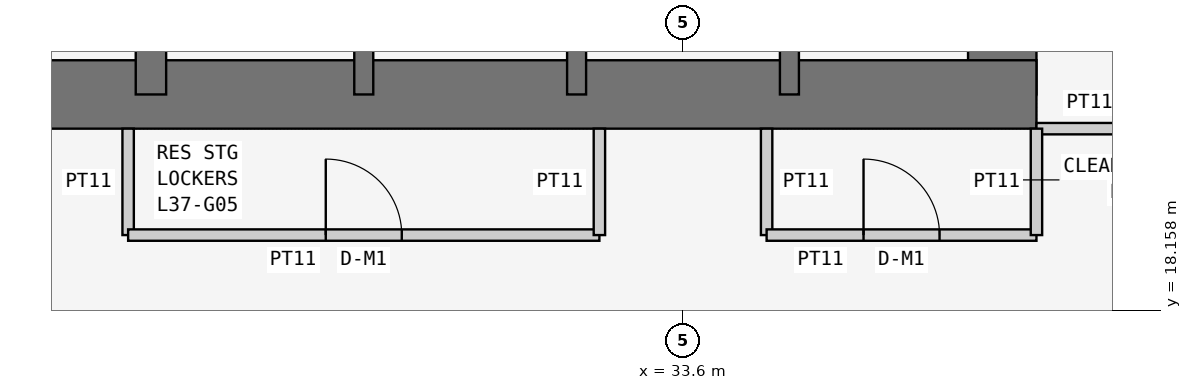
"""IFC4 building model, lengths in metres.
Left out: names, types, materials, properties, quantities, classifications, styles, units other than length and angle.
Written with IfcOpenShell. Run it as: python <this file> out.ifc"""

import sys

from ifc_helpers import new_model, si_unit, direction, frame, frame_2d, origin, place, context, subcontext, project, spatial, rectangle, extrude, element, fill, save


model = new_model("IFC4")
c1 = context("Model", 3, precision=1e-05, world=origin(), true_north=direction((0.0, 1.0)))
c2 = subcontext(c1, "Body", "Model", "MODEL_VIEW")
j1 = project(units=[si_unit("LENGTHUNIT", "METRE"), si_unit("PLANEANGLEUNIT", "RADIAN")], contexts=[c1])
p1 = place(None, origin())
s1 = spatial("IfcSite", under=j1, at=p1, CompositionType="ELEMENT")
p2 = place(p1, origin())
s2 = spatial("IfcBuilding", under=s1, at=p2, CompositionType="ELEMENT")
p3 = place(p2, frame((0.0, 0.0, 144.9)))
s3 = spatial("IfcBuildingStorey", under=s2, at=p3, CompositionType="ELEMENT", Elevation=144.9)
p4 = place(p3, frame((21.0, 21.0, 0.0), z_axis=(0.0, 0.0, 1.0), x_axis=(1.0, 0.0, 0.0)))
e1 = element("IfcWall", 1, at=p4, inside=s3, PredefinedType="SHEAR", context=c2, shape_type="SweptSolid", body=[
    extrude(rectangle(XDim=17.25, YDim=0.9, at=frame_2d((8.625, 0.0))), origin(), (0.0, 0.0, 1.0), 3.6),
])
p5 = place(p3, frame((37.8, 21.0, 0.0), z_axis=(0.0, 0.0, 1.0), x_axis=(0.0, 1.0, 0.0)))
e2 = element("IfcWall", 2, at=p5, inside=s3, PredefinedType="SHEAR", context=c2, shape_type="SweptSolid", body=[
    extrude(rectangle(XDim=17.25, YDim=0.9, at=frame_2d((8.625, 0.0))), origin(), (0.0, 0.0, 1.0), 3.6),
])
p6 = place(p5, frame((5.2, 0.0, 0.0)))
e3 = element("IfcOpeningElement", 3, at=p6, cuts=e2, PredefinedType="OPENING", context=c2, shape_type="SweptSolid", body=[
    extrude(rectangle(XDim=1.2, YDim=2.1, at=frame_2d((0.6, 1.05))), frame((0.0, 0.46, 0.0), z_axis=(0.0, -1.0, 0.0), x_axis=(1.0, 0.0, 0.0)), (0.0, 0.0, 1.0), 0.92),
])
p7 = place(p3, frame((26.6, 21.0, 0.0), z_axis=(0.0, 0.0, 1.0), x_axis=(0.0, 1.0, 0.0)))
e4 = element("IfcWall", 4, at=p7, inside=s3, PredefinedType="SHEAR", context=c2, shape_type="SweptSolid", body=[
    extrude(rectangle(XDim=16.8, YDim=0.4, at=frame_2d((8.4, 0.0))), origin(), (0.0, 0.0, 1.0), 3.6),
])
p8 = place(p7, frame((10.4, 0.0, 0.0)))
e5 = element("IfcOpeningElement", 5, at=p8, cuts=e4, PredefinedType="OPENING", context=c2, shape_type="SweptSolid", body=[
    extrude(rectangle(XDim=1.2, YDim=2.1, at=frame_2d((0.6, 1.05))), frame((0.0, 0.21, 0.0), z_axis=(0.0, -1.0, 0.0), x_axis=(1.0, 0.0, 0.0)), (0.0, 0.0, 1.0), 0.42),
])
for number, where, z_axis, x_axis in (
    (6, (29.4, 21.0, 0.0), (0.0, 0.0, 1.0), (0.0, 1.0, 0.0)),
    (7, (32.2, 21.0, 0.0), (0.0, 0.0, 1.0), (0.0, 1.0, 0.0)),
    (8, (35.0, 21.0, 0.0), (0.0, 0.0, 1.0), (0.0, 1.0, 0.0)),
):
    element("IfcWall", number, at=place(p3, frame(where, z_axis=z_axis, x_axis=x_axis)), inside=s3, PredefinedType="SHEAR", context=c2, shape_type="SweptSolid", body=[
        extrude(rectangle(XDim=3.2, YDim=0.25, at=frame_2d((1.6, 0.0))), origin(), (0.0, 0.0, 1.0), 3.6),
    ])
p9 = place(p3, frame((38.25, 20.55, 0.0), z_axis=(0.0, 0.0, 1.0), x_axis=(1.0, 0.0, 0.0)))
e9 = element("IfcWall", 9, at=p9, inside=s3, PredefinedType="PARTITIONING", context=c2, shape_type="SweptSolid", body=[
    extrude(rectangle(XDim=1.4, YDim=0.15, at=frame_2d((0.7, 0.0))), origin(), (0.0, 0.0, 1.0), 3.45),
])
p10 = place(p3, frame((26.3, 20.55, 0.0), z_axis=(0.0, 0.0, 1.0), x_axis=(0.0, -1.0, 0.0)))
e10 = element("IfcWall", 10, at=p10, inside=s3, PredefinedType="PARTITIONING", context=c2, shape_type="SweptSolid", body=[
    extrude(rectangle(XDim=1.4, YDim=0.15, at=frame_2d((0.7, 0.0))), origin(), (0.0, 0.0, 1.0), 3.45),
])
p11 = place(p3, frame((26.3, 19.15, 0.0), z_axis=(0.0, 0.0, 1.0), x_axis=(1.0, 0.0, 0.0)))
e11 = element("IfcWall", 11, at=p11, inside=s3, PredefinedType="PARTITIONING", context=c2, shape_type="SweptSolid", body=[
    extrude(rectangle(XDim=6.2, YDim=0.15, at=frame_2d((3.1, 0.0))), origin(), (0.0, 0.0, 1.0), 3.45),
])
p12 = place(p11, frame((2.6, 0.0, 0.0)))
e12 = element("IfcOpeningElement", 12, at=p12, cuts=e11, PredefinedType="OPENING", context=c2, shape_type="SweptSolid", body=[
    extrude(rectangle(XDim=1.0, YDim=2.1, at=frame_2d((0.5, 1.05))), frame((0.0, 0.085, 0.0), z_axis=(0.0, -1.0, 0.0), x_axis=(1.0, 0.0, 0.0)), (0.0, 0.0, 1.0), 0.17),
])
for number, where, z_axis, x_axis in (
    (13, (32.5, 19.15, 0.0), (0.0, 0.0, 1.0), (0.0, 1.0, 0.0)),
    (14, (34.7, 20.55, 0.0), (0.0, 0.0, 1.0), (0.0, -1.0, 0.0)),
):
    element("IfcWall", number, at=place(p3, frame(where, z_axis=z_axis, x_axis=x_axis)), inside=s3, PredefinedType="PARTITIONING", context=c2, shape_type="SweptSolid", body=[
        extrude(rectangle(XDim=1.4, YDim=0.15, at=frame_2d((0.7, 0.0))), origin(), (0.0, 0.0, 1.0), 3.45),
    ])
p13 = place(p3, frame((34.7, 19.15, 0.0), z_axis=(0.0, 0.0, 1.0), x_axis=(1.0, 0.0, 0.0)))
e15 = element("IfcWall", 15, at=p13, inside=s3, PredefinedType="PARTITIONING", context=c2, shape_type="SweptSolid", body=[
    extrude(rectangle(XDim=3.55, YDim=0.15, at=frame_2d((1.775, 0.0))), origin(), (0.0, 0.0, 1.0), 3.45),
])
p14 = place(p13, frame((1.275, 0.0, 0.0)))
e16 = element("IfcOpeningElement", 16, at=p14, cuts=e15, PredefinedType="OPENING", context=c2, shape_type="SweptSolid", body=[
    extrude(rectangle(XDim=1.0, YDim=2.1, at=frame_2d((0.5, 1.05))), frame((0.0, 0.085, 0.0), z_axis=(0.0, -1.0, 0.0), x_axis=(1.0, 0.0, 0.0)), (0.0, 0.0, 1.0), 0.17),
])
p15 = place(p3, frame((38.25, 19.15, 0.0), z_axis=(0.0, 0.0, 1.0), x_axis=(0.0, 1.0, 0.0)))
e17 = element("IfcWall", 17, at=p15, inside=s3, PredefinedType="PARTITIONING", context=c2, shape_type="SweptSolid", body=[
    extrude(rectangle(XDim=1.4, YDim=0.15, at=frame_2d((0.7, 0.0))), origin(), (0.0, 0.0, 1.0), 3.45),
])
p16 = place(p12, origin())
e18 = element("IfcDoor", 18, at=p16, inside=s3, OperationType="SINGLE_SWING_LEFT", PredefinedType="DOOR", context=c2, shape_type="SweptSolid", body=[
    extrude(rectangle(XDim=1.0, YDim=2.1, at=frame_2d((0.5, 1.05))), frame((0.0, 0.025, 0.0), z_axis=(0.0, -1.0, 0.0), x_axis=(1.0, 0.0, 0.0)), (0.0, 0.0, 1.0), 0.05),
])
fill(e12, e18)
p17 = place(p14, origin())
e19 = element("IfcDoor", 19, at=p17, inside=s3, OperationType="SINGLE_SWING_LEFT", PredefinedType="DOOR", context=c2, shape_type="SweptSolid", body=[
    extrude(rectangle(XDim=1.0, YDim=2.1, at=frame_2d((0.5, 1.05))), frame((0.0, 0.025, 0.0), z_axis=(0.0, -1.0, 0.0), x_axis=(1.0, 0.0, 0.0)), (0.0, 0.0, 1.0), 0.05),
])
fill(e16, e19)
save(model, sys.argv[1])
